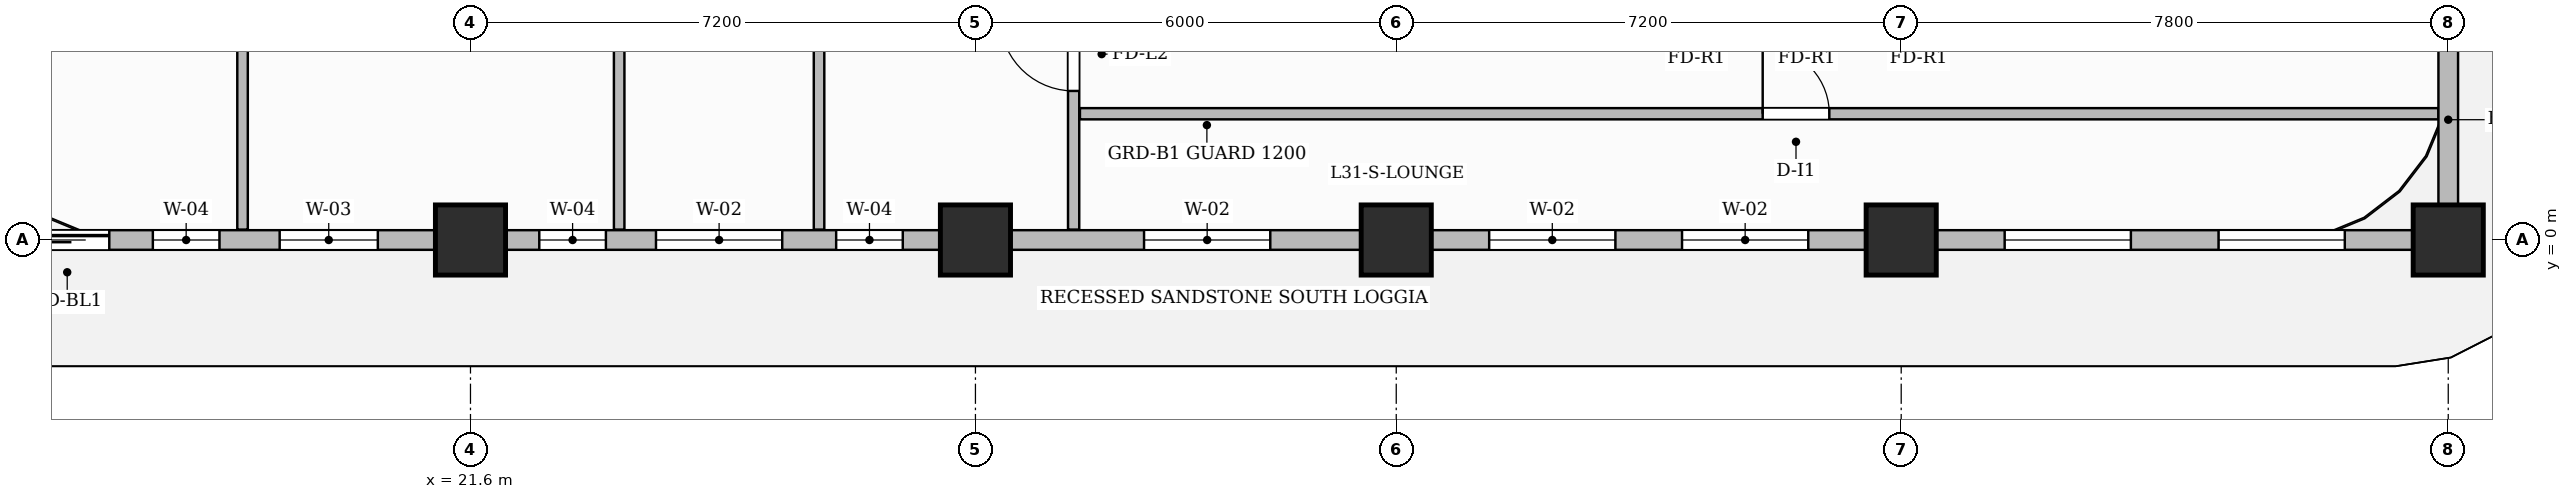
"""IFC4 building model, lengths in metres.
Left out: names, types, materials, properties, quantities, classifications, styles, units other than length and angle.
Written with IfcOpenShell. Run it as: python <this file> out.ifc"""

import sys

from ifc_helpers import new_model, si_unit, direction, frame, frame_2d, origin, origin_2d, place, context, subcontext, project, spatial, rectangle, extrude, source, transform, mapped, element, fill, save


model = new_model("IFC4")
c1 = context("Model", 3, precision=1e-05, world=origin(), true_north=direction((0.0, 1.0)))
c2 = subcontext(c1, "Body", "Model", "MODEL_VIEW")
j1 = project(units=[si_unit("LENGTHUNIT", "METRE"), si_unit("PLANEANGLEUNIT", "RADIAN")], contexts=[c1])
p1 = place(None, origin())
s1 = spatial("IfcSite", under=j1, at=p1, CompositionType="ELEMENT")
p2 = place(p1, origin())
s2 = spatial("IfcBuilding", under=s1, at=p2, CompositionType="ELEMENT")
p3 = place(p2, frame((0.0, 0.0, 126.6)))
s3 = spatial("IfcBuildingStorey", under=s2, at=p3, CompositionType="ELEMENT", Elevation=126.6)
m1 = source(origin(), c2, "Body", "SweptSolid", [
    extrude(rectangle(XDim=1.0, YDim=1.0, at=origin_2d()), origin(), (0.0, 0.0, 1.0), 3.7),
])
for number, where, z_axis, x_axis in (
    (1, (21.6, 0.0, 0.0), (0.0, 0.0, 1.0), (1.0, 0.0, 0.0)),
    (2, (28.8, 0.0, 0.0), (0.0, 0.0, 1.0), (1.0, 0.0, 0.0)),
    (3, (34.8, 0.0, 0.0), (0.0, 0.0, 1.0), (1.0, 0.0, 0.0)),
    (4, (42.0, 0.0, 0.0), (0.0, 0.0, 1.0), (1.0, 0.0, 0.0)),
    (5, (49.8, 0.0, 0.0), (0.0, 0.0, 1.0), (1.0, 0.0, 0.0)),
):
    element("IfcColumn", number, at=place(p3, frame(where, z_axis=z_axis, x_axis=x_axis)), inside=s3, PredefinedType="COLUMN", context=c2, shape_type="MappedRepresentation", body=[
        mapped(m1, transform((0.0, 0.0, 0.0), scale=1.0)),
    ])
p4 = place(p3, frame((30.2, 0.148, 0.0), z_axis=(0.0, 0.0, 1.0), x_axis=(0.0, 1.0, 0.0)))
e6 = element("IfcWall", 6, at=p4, inside=s3, PredefinedType="PARTITIONING", context=c2, shape_type="SweptSolid", body=[
    extrude(rectangle(XDim=10.112, YDim=0.16, at=frame_2d((5.056, 0.0))), origin(), (0.0, 0.0, 1.0), 3.45),
])
p5 = place(p4, frame((1.977, 0.0, 0.0)))
e7 = element("IfcOpeningElement", 7, at=p5, cuts=e6, PredefinedType="OPENING", context=c2, shape_type="SweptSolid", body=[
    extrude(rectangle(XDim=1.05, YDim=2.15, at=frame_2d((0.525, 1.075))), frame((0.0, 0.09, 0.0), z_axis=(0.0, -1.0, 0.0), x_axis=(1.0, 0.0, 0.0)), (0.0, 0.0, 1.0), 0.18),
])
p6 = place(p3, frame((30.29, 1.8, 0.0), z_axis=(0.0, 0.0, 1.0), x_axis=(1.0, 0.0, 0.0)))
e8 = element("IfcWall", 8, at=p6, inside=s3, PredefinedType="PARTITIONING", context=c2, shape_type="SweptSolid", body=[
    extrude(rectangle(XDim=19.37, YDim=0.16, at=frame_2d((9.685, 0.0))), origin(), (0.0, 0.0, 1.0), 3.45),
])
p7 = place(p6, frame((9.735, 0.0, 0.0)))
e9 = element("IfcOpeningElement", 9, at=p7, cuts=e8, PredefinedType="OPENING", context=c2, shape_type="SweptSolid", body=[
    extrude(rectangle(XDim=0.95, YDim=2.15, at=frame_2d((0.475, 1.075))), frame((0.0, 0.09, 0.0), z_axis=(0.0, -1.0, 0.0), x_axis=(1.0, 0.0, 0.0)), (0.0, 0.0, 1.0), 0.18),
])
for number, where, z_axis, x_axis in (
    (10, (18.35, 0.148, 0.0), (0.0, 0.0, 1.0), (0.0, 1.0, 0.0)),
    (11, (23.72, 0.148, 0.0), (0.0, 0.0, 1.0), (0.0, 1.0, 0.0)),
    (12, (26.57, 0.148, 0.0), (0.0, 0.0, 1.0), (0.0, 1.0, 0.0)),
):
    element("IfcWall", number, at=place(p3, frame(where, z_axis=z_axis, x_axis=x_axis)), inside=s3, PredefinedType="PARTITIONING", context=c2, shape_type="SweptSolid", body=[
        extrude(rectangle(XDim=10.112, YDim=0.15, at=frame_2d((5.056, 0.0))), origin(), (0.0, 0.0, 1.0), 3.45),
    ])
p8 = place(p3, frame((14.4, 0.0, 0.0), z_axis=(0.0, 0.0, 1.0), x_axis=(1.0, 0.0, 0.0)))
e13 = element("IfcWall", 13, at=p8, inside=s3, PredefinedType="SOLIDWALL", context=c2, shape_type="SweptSolid", body=[
    extrude(rectangle(XDim=35.4, YDim=0.28, at=frame_2d((17.7, 0.0))), origin(), (0.0, 0.0, 1.0), 2.935),
])
p9 = place(p8, frame((0.85, 0.0, 0.0)))
e14 = element("IfcOpeningElement", 14, at=p9, cuts=e13, PredefinedType="OPENING", context=c2, shape_type="SweptSolid", body=[
    extrude(rectangle(XDim=1.2, YDim=2.2, at=frame_2d((0.6, 1.1))), frame((0.0, 0.15, 0.0), z_axis=(0.0, -1.0, 0.0), x_axis=(1.0, 0.0, 0.0)), (0.0, 0.0, 1.0), 0.3),
])
p10 = place(p8, frame((2.671, 0.0, 0.8)))
e15 = element("IfcOpeningElement", 15, at=p10, cuts=e13, PredefinedType="OPENING", context=c2, shape_type="SweptSolid", body=[
    extrude(rectangle(XDim=0.95, YDim=1.75, at=frame_2d((0.475, 0.875))), frame((0.0, 0.15, 0.0), z_axis=(0.0, -1.0, 0.0), x_axis=(1.0, 0.0, 0.0)), (0.0, 0.0, 1.0), 0.3),
])
p11 = place(p8, frame((4.479, 0.0, 0.8)))
e16 = element("IfcOpeningElement", 16, at=p11, cuts=e13, PredefinedType="OPENING", context=c2, shape_type="SweptSolid", body=[
    extrude(rectangle(XDim=1.4, YDim=1.85, at=frame_2d((0.7, 0.925))), frame((0.0, 0.15, 0.0), z_axis=(0.0, -1.0, 0.0), x_axis=(1.0, 0.0, 0.0)), (0.0, 0.0, 1.0), 0.3),
])
p12 = place(p8, frame((8.181, 0.0, 0.8)))
e17 = element("IfcOpeningElement", 17, at=p12, cuts=e13, PredefinedType="OPENING", context=c2, shape_type="SweptSolid", body=[
    extrude(rectangle(XDim=0.95, YDim=1.75, at=frame_2d((0.475, 0.875))), frame((0.0, 0.15, 0.0), z_axis=(0.0, -1.0, 0.0), x_axis=(1.0, 0.0, 0.0)), (0.0, 0.0, 1.0), 0.3),
])
p13 = place(p8, frame((9.845, 0.0, 0.8)))
e18 = element("IfcOpeningElement", 18, at=p13, cuts=e13, PredefinedType="OPENING", context=c2, shape_type="SweptSolid", body=[
    extrude(rectangle(XDim=1.8, YDim=1.85, at=frame_2d((0.9, 0.925))), frame((0.0, 0.15, 0.0), z_axis=(0.0, -1.0, 0.0), x_axis=(1.0, 0.0, 0.0)), (0.0, 0.0, 1.0), 0.3),
])
p14 = place(p8, frame((12.414, 0.0, 0.8)))
e19 = element("IfcOpeningElement", 19, at=p14, cuts=e13, PredefinedType="OPENING", context=c2, shape_type="SweptSolid", body=[
    extrude(rectangle(XDim=0.95, YDim=1.75, at=frame_2d((0.475, 0.875))), frame((0.0, 0.15, 0.0), z_axis=(0.0, -1.0, 0.0), x_axis=(1.0, 0.0, 0.0)), (0.0, 0.0, 1.0), 0.3),
])
p15 = place(p8, frame((16.804, 0.0, 0.8)))
e20 = element("IfcOpeningElement", 20, at=p15, cuts=e13, PredefinedType="OPENING", context=c2, shape_type="SweptSolid", body=[
    extrude(rectangle(XDim=1.8, YDim=1.85, at=frame_2d((0.9, 0.925))), frame((0.0, 0.15, 0.0), z_axis=(0.0, -1.0, 0.0), x_axis=(1.0, 0.0, 0.0)), (0.0, 0.0, 1.0), 0.3),
])
p16 = place(p8, frame((21.725, 0.0, 0.8)))
e21 = element("IfcOpeningElement", 21, at=p16, cuts=e13, PredefinedType="OPENING", context=c2, shape_type="SweptSolid", body=[
    extrude(rectangle(XDim=1.8, YDim=1.85, at=frame_2d((0.9, 0.925))), frame((0.0, 0.15, 0.0), z_axis=(0.0, -1.0, 0.0), x_axis=(1.0, 0.0, 0.0)), (0.0, 0.0, 1.0), 0.3),
])
p17 = place(p8, frame((24.475, 0.0, 0.8)))
e22 = element("IfcOpeningElement", 22, at=p17, cuts=e13, PredefinedType="OPENING", context=c2, shape_type="SweptSolid", body=[
    extrude(rectangle(XDim=1.8, YDim=1.85, at=frame_2d((0.9, 0.925))), frame((0.0, 0.15, 0.0), z_axis=(0.0, -1.0, 0.0), x_axis=(1.0, 0.0, 0.0)), (0.0, 0.0, 1.0), 0.3),
])
p18 = place(p8, frame((29.075, 0.0, 0.8)))
e23 = element("IfcOpeningElement", 23, at=p18, cuts=e13, PredefinedType="OPENING", context=c2, shape_type="SweptSolid", body=[
    extrude(rectangle(XDim=1.8, YDim=1.85, at=frame_2d((0.9, 0.925))), frame((0.0, 0.15, 0.0), z_axis=(0.0, -1.0, 0.0), x_axis=(1.0, 0.0, 0.0)), (0.0, 0.0, 1.0), 0.3),
])
p19 = place(p8, frame((32.125, 0.0, 0.8)))
e24 = element("IfcOpeningElement", 24, at=p19, cuts=e13, PredefinedType="OPENING", context=c2, shape_type="SweptSolid", body=[
    extrude(rectangle(XDim=1.8, YDim=1.85, at=frame_2d((0.9, 0.925))), frame((0.0, 0.15, 0.0), z_axis=(0.0, -1.0, 0.0), x_axis=(1.0, 0.0, 0.0)), (0.0, 0.0, 1.0), 0.3),
])
p20 = place(p3, frame((49.8, 0.05, 0.0), z_axis=(0.0, 0.0, 1.0), x_axis=(0.0, 1.0, 0.0)))
e25 = element("IfcWall", 25, at=p20, inside=s3, PredefinedType="SOLIDWALL", context=c2, shape_type="SweptSolid", body=[
    extrude(rectangle(XDim=3.33, YDim=0.28, at=frame_2d((1.665, 0.0))), origin(), (0.0, 0.0, 1.0), 3.45),
])
m2 = source(origin(), c2, "Body", "SweptSolid", [
    extrude(rectangle(XDim=1.05, YDim=2.15, at=frame_2d((0.525, 1.075))), frame((0.0, 0.025, 0.0), z_axis=(0.0, -1.0, 0.0), x_axis=(1.0, 0.0, 0.0)), (0.0, 0.0, 1.0), 0.05),
])
p21 = place(p5, origin())
e26 = element("IfcDoor", 26, at=p21, inside=s3, OperationType="SINGLE_SWING_RIGHT", PredefinedType="DOOR", context=c2, shape_type="MappedRepresentation", body=[
    mapped(m2, transform((0.0, 0.0, 0.0), scale=1.0)),
])
fill(e7, e26)
m3 = source(origin(), c2, "Body", "SweptSolid", [
    extrude(rectangle(XDim=0.95, YDim=2.15, at=frame_2d((0.475, 1.075))), frame((0.0, 0.025, 0.0), z_axis=(0.0, -1.0, 0.0), x_axis=(1.0, 0.0, 0.0)), (0.0, 0.0, 1.0), 0.05),
])
p22 = place(p7, origin())
e27 = element("IfcDoor", 27, at=p22, inside=s3, OperationType="SINGLE_SWING_LEFT", PredefinedType="DOOR", context=c2, shape_type="MappedRepresentation", body=[
    mapped(m3, transform((0.0, 0.0, 0.0), scale=1.0)),
])
fill(e9, e27)
m4 = source(origin(), c2, "Body", "SweptSolid", [
    extrude(rectangle(XDim=1.2, YDim=2.2, at=frame_2d((0.6, 1.1))), frame((0.0, 0.025, 0.0), z_axis=(0.0, -1.0, 0.0), x_axis=(1.0, 0.0, 0.0)), (0.0, 0.0, 1.0), 0.05),
])
p23 = place(p9, origin())
e28 = element("IfcDoor", 28, at=p23, inside=s3, OperationType="SLIDING_TO_LEFT", PredefinedType="DOOR", context=c2, shape_type="MappedRepresentation", body=[
    mapped(m4, transform((0.0, 0.0, 0.0), scale=1.0)),
])
fill(e14, e28)
m5 = source(origin(), c2, "Body", "SweptSolid", [
    extrude(rectangle(XDim=0.95, YDim=1.75, at=frame_2d((0.475, 0.875))), frame((0.0, 0.03, 0.0), z_axis=(0.0, -1.0, 0.0), x_axis=(1.0, 0.0, 0.0)), (0.0, 0.0, 1.0), 0.06),
])
p24 = place(p10, origin())
e29 = element("IfcWindow", 29, at=p24, inside=s3, PartitioningType="SINGLE_PANEL", PredefinedType="WINDOW", context=c2, shape_type="MappedRepresentation", body=[
    mapped(m5, transform((0.0, 0.0, 0.0), scale=1.0)),
])
fill(e15, e29)
m6 = source(origin(), c2, "Body", "SweptSolid", [
    extrude(rectangle(XDim=1.4, YDim=1.85, at=frame_2d((0.7, 0.925))), frame((0.0, 0.03, 0.0), z_axis=(0.0, -1.0, 0.0), x_axis=(1.0, 0.0, 0.0)), (0.0, 0.0, 1.0), 0.06),
])
p25 = place(p11, origin())
e30 = element("IfcWindow", 30, at=p25, inside=s3, PartitioningType="SINGLE_PANEL", PredefinedType="WINDOW", context=c2, shape_type="MappedRepresentation", body=[
    mapped(m6, transform((0.0, 0.0, 0.0), scale=1.0)),
])
fill(e16, e30)
p26 = place(p12, origin())
e31 = element("IfcWindow", 31, at=p26, inside=s3, PartitioningType="SINGLE_PANEL", PredefinedType="WINDOW", context=c2, shape_type="MappedRepresentation", body=[
    mapped(m5, transform((0.0, 0.0, 0.0), scale=1.0)),
])
fill(e17, e31)
m7 = source(origin(), c2, "Body", "SweptSolid", [
    extrude(rectangle(XDim=1.8, YDim=1.85, at=frame_2d((0.9, 0.925))), frame((0.0, 0.03, 0.0), z_axis=(0.0, -1.0, 0.0), x_axis=(1.0, 0.0, 0.0)), (0.0, 0.0, 1.0), 0.06),
])
p27 = place(p13, origin())
e32 = element("IfcWindow", 32, at=p27, inside=s3, PartitioningType="DOUBLE_PANEL_VERTICAL", PredefinedType="WINDOW", context=c2, shape_type="MappedRepresentation", body=[
    mapped(m7, transform((0.0, 0.0, 0.0), scale=1.0)),
])
fill(e18, e32)
p28 = place(p14, origin())
e33 = element("IfcWindow", 33, at=p28, inside=s3, PartitioningType="SINGLE_PANEL", PredefinedType="WINDOW", context=c2, shape_type="MappedRepresentation", body=[
    mapped(m5, transform((0.0, 0.0, 0.0), scale=1.0)),
])
fill(e19, e33)
p29 = place(p15, origin())
e34 = element("IfcWindow", 34, at=p29, inside=s3, PartitioningType="DOUBLE_PANEL_VERTICAL", PredefinedType="WINDOW", context=c2, shape_type="MappedRepresentation", body=[
    mapped(m7, transform((0.0, 0.0, 0.0), scale=1.0)),
])
fill(e20, e34)
p30 = place(p16, origin())
e35 = element("IfcWindow", 35, at=p30, inside=s3, PartitioningType="DOUBLE_PANEL_VERTICAL", PredefinedType="WINDOW", context=c2, shape_type="MappedRepresentation", body=[
    mapped(m7, transform((0.0, 0.0, 0.0), scale=1.0)),
])
fill(e21, e35)
p31 = place(p17, origin())
e36 = element("IfcWindow", 36, at=p31, inside=s3, PartitioningType="DOUBLE_PANEL_VERTICAL", PredefinedType="WINDOW", context=c2, shape_type="MappedRepresentation", body=[
    mapped(m7, transform((0.0, 0.0, 0.0), scale=1.0)),
])
fill(e22, e36)
p32 = place(p18, origin())
e37 = element("IfcWindow", 37, at=p32, inside=s3, PartitioningType="DOUBLE_PANEL_VERTICAL", PredefinedType="WINDOW", context=c2, shape_type="MappedRepresentation", body=[
    mapped(m7, transform((0.0, 0.0, 0.0), scale=1.0)),
])
fill(e23, e37)
p33 = place(p19, origin())
e38 = element("IfcWindow", 38, at=p33, inside=s3, PartitioningType="DOUBLE_PANEL_VERTICAL", PredefinedType="WINDOW", context=c2, shape_type="MappedRepresentation", body=[
    mapped(m7, transform((0.0, 0.0, 0.0), scale=1.0)),
])
fill(e24, e38)
save(model, sys.argv[1])
